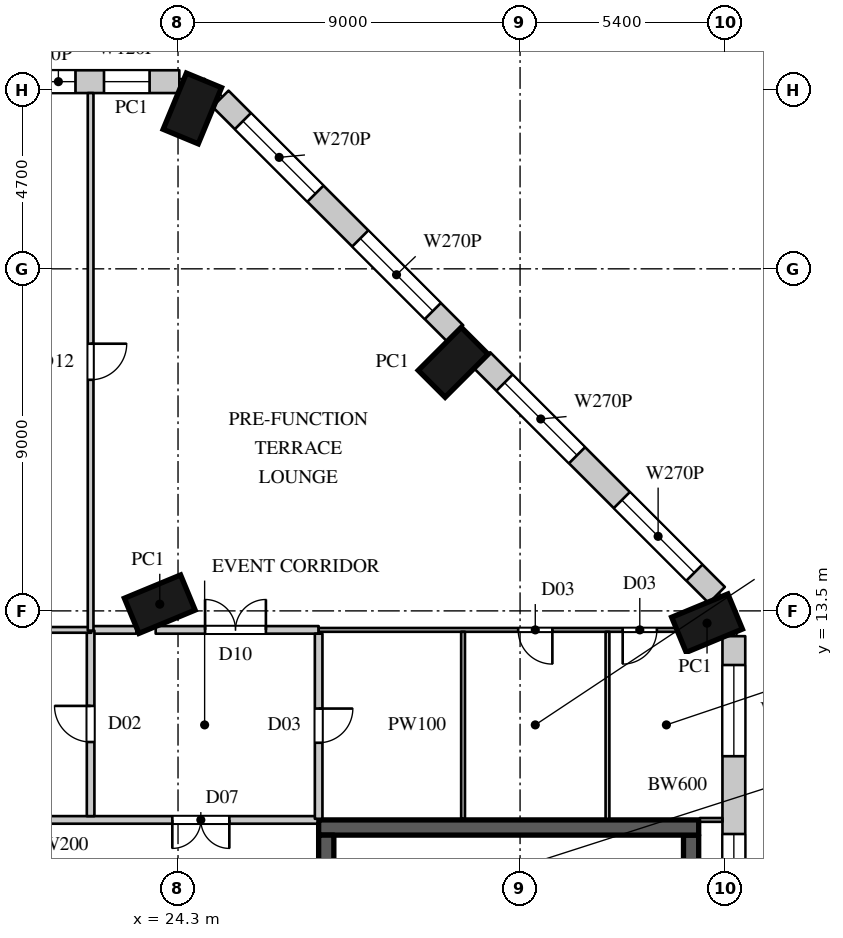
"""IFC4 building model, lengths in metres.
Left out: names, types, materials, properties, quantities, classifications, styles, units other than length and angle.
Written with IfcOpenShell. Run it as: python <this file> out.ifc"""

import sys

from ifc_helpers import new_model, si_unit, direction, frame, frame_2d, origin, origin_2d, place, context, subcontext, project, spatial, rectangle, extrude, element, fill, save


model = new_model("IFC4")
c1 = context("Model", 3, precision=1e-05, world=origin(), true_north=direction((0.0, 1.0)))
c2 = subcontext(c1, "Body", "Model", "MODEL_VIEW")
j1 = project(units=[si_unit("LENGTHUNIT", "METRE"), si_unit("PLANEANGLEUNIT", "RADIAN")], contexts=[c1])
p1 = place(None, origin())
s1 = spatial("IfcSite", under=j1, at=p1, CompositionType="ELEMENT")
p2 = place(p1, origin())
s2 = spatial("IfcBuilding", under=s1, at=p2, CompositionType="ELEMENT")
p3 = place(p2, frame((0.0, 0.0, 36.0)))
s3 = spatial("IfcBuildingStorey", under=s2, at=p3, CompositionType="ELEMENT", Elevation=36.0)
for number, where, z_axis, x_axis in (
    (1, (23.82, 13.677, 0.0), (0.0, 0.0, 1.0), (-0.383, 0.924, 0.0)),
    (2, (38.219, 13.177, 0.0), (0.0, 0.0, 1.0), (-0.383, 0.924, 0.0)),
    (3, (31.54, 20.04, 0.0), (0.0, 0.0, 1.0), (-0.707, 0.707, 0.0)),
    (4, (24.677, 26.719, 0.0), (0.0, 0.0, 1.0), (-0.924, 0.383, 0.0)),
):
    element("IfcColumn", number, at=place(p3, frame(where, z_axis=z_axis, x_axis=x_axis)), inside=s3, PredefinedType="COLUMN", context=c2, shape_type="SweptSolid", body=[
        extrude(rectangle(XDim=1.0, YDim=1.6, at=origin_2d()), origin(), (0.0, 0.0, 1.0), 8.0),
    ])
p4 = place(p3, frame((38.925, 5.0, 0.0), z_axis=(0.0, 0.0, 1.0), x_axis=(0.0, 1.0, 0.0)))
e5 = element("IfcWall", 5, at=p4, inside=s3, PredefinedType="ELEMENTEDWALL", context=c2, shape_type="SweptSolid", body=[
    extrude(rectangle(XDim=7.834, YDim=0.6, at=frame_2d((3.917, 0.0))), origin(), (0.0, 0.0, 1.0), 7.6),
])
p5 = place(p4, frame((4.676, 0.0, 1.5)))
e6 = element("IfcOpeningElement", 6, at=p5, cuts=e5, PredefinedType="OPENING", context=c2, shape_type="SweptSolid", body=[
    extrude(rectangle(XDim=2.4, YDim=2.4, at=frame_2d((1.2, 1.2))), frame((0.0, 0.31, 0.0), z_axis=(0.0, -1.0, 0.0), x_axis=(1.0, 0.0, 0.0)), (0.0, 0.0, 1.0), 0.62),
])
p6 = place(p4, frame((0.829, 0.0, 1.5)))
e7 = element("IfcOpeningElement", 7, at=p6, cuts=e5, PredefinedType="OPENING", context=c2, shape_type="SweptSolid", body=[
    extrude(rectangle(XDim=1.8, YDim=2.4, at=frame_2d((0.9, 1.2))), frame((0.0, 0.31, 0.0), z_axis=(0.0, -1.0, 0.0), x_axis=(1.0, 0.0, 0.0)), (0.0, 0.0, 1.0), 0.62),
])
p7 = place(p3, frame((38.476, 13.917, 0.0), z_axis=(0.0, 0.0, 1.0), x_axis=(-0.707092804673, 0.707120757424, 0.0)))
e8 = element("IfcWall", 8, at=p7, inside=s3, PredefinedType="ELEMENTEDWALL", context=c2, shape_type="SweptSolid", body=[
    extrude(rectangle(XDim=8.734, YDim=0.6, at=frame_2d((4.367, 0.0))), origin(), (0.0, 0.0, 1.0), 7.6),
])
p8 = place(p7, frame((0.833, 0.0, 1.5)))
e9 = element("IfcOpeningElement", 9, at=p8, cuts=e8, PredefinedType="OPENING", context=c2, shape_type="SweptSolid", body=[
    extrude(rectangle(XDim=2.7, YDim=2.4, at=frame_2d((1.35, 1.2))), frame((0.0, 0.31, 0.0), z_axis=(0.0, -1.0, 0.0), x_axis=(1.0, 0.0, 0.0)), (0.0, 0.0, 1.0), 0.62),
])
p9 = place(p7, frame((5.2, 0.0, 1.5)))
e10 = element("IfcOpeningElement", 10, at=p9, cuts=e8, PredefinedType="OPENING", context=c2, shape_type="SweptSolid", body=[
    extrude(rectangle(XDim=2.7, YDim=2.4, at=frame_2d((1.35, 1.2))), frame((0.0, 0.31, 0.0), z_axis=(0.0, -1.0, 0.0), x_axis=(1.0, 0.0, 0.0)), (0.0, 0.0, 1.0), 0.62),
])
p10 = place(p3, frame((31.594, 20.801, 0.0), z_axis=(0.0, 0.0, 1.0), x_axis=(-0.707120757424, 0.707092804673, 0.0)))
e11 = element("IfcWall", 11, at=p10, inside=s3, PredefinedType="ELEMENTEDWALL", context=c2, shape_type="SweptSolid", body=[
    extrude(rectangle(XDim=8.734, YDim=0.6, at=frame_2d((4.367, 0.0))), origin(), (0.0, 0.0, 1.0), 7.6),
])
p11 = place(p10, frame((0.833, 0.0, 1.5)))
e12 = element("IfcOpeningElement", 12, at=p11, cuts=e11, PredefinedType="OPENING", context=c2, shape_type="SweptSolid", body=[
    extrude(rectangle(XDim=2.7, YDim=2.4, at=frame_2d((1.35, 1.2))), frame((0.0, 0.31, 0.0), z_axis=(0.0, -1.0, 0.0), x_axis=(1.0, 0.0, 0.0)), (0.0, 0.0, 1.0), 0.62),
])
p12 = place(p10, frame((5.2, 0.0, 1.5)))
e13 = element("IfcOpeningElement", 13, at=p12, cuts=e11, PredefinedType="OPENING", context=c2, shape_type="SweptSolid", body=[
    extrude(rectangle(XDim=2.7, YDim=2.4, at=frame_2d((1.35, 1.2))), frame((0.0, 0.31, 0.0), z_axis=(0.0, -1.0, 0.0), x_axis=(1.0, 0.0, 0.0)), (0.0, 0.0, 1.0), 0.62),
])
p13 = place(p3, frame((24.334, 27.425, 0.0), z_axis=(0.0, 0.0, 1.0), x_axis=(-1.0, 0.0, 0.0)))
e14 = element("IfcWall", 14, at=p13, inside=s3, PredefinedType="ELEMENTEDWALL", context=c2, shape_type="SweptSolid", body=[
    extrude(rectangle(XDim=53.534, YDim=0.6, at=frame_2d((26.767, 0.0))), origin(), (0.0, 0.0, 1.0), 7.6),
])
p14 = place(p13, frame((5.192, 0.0, 1.5)))
e15 = element("IfcOpeningElement", 15, at=p14, cuts=e14, PredefinedType="OPENING", context=c2, shape_type="SweptSolid", body=[
    extrude(rectangle(XDim=3.0, YDim=2.4, at=frame_2d((1.5, 1.2))), frame((0.0, 0.31, 0.0), z_axis=(0.0, -1.0, 0.0), x_axis=(1.0, 0.0, 0.0)), (0.0, 0.0, 1.0), 0.62),
])
p15 = place(p13, frame((14.114, 0.0, 1.5)))
e16 = element("IfcOpeningElement", 16, at=p15, cuts=e14, PredefinedType="OPENING", context=c2, shape_type="SweptSolid", body=[
    extrude(rectangle(XDim=3.0, YDim=2.4, at=frame_2d((1.5, 1.2))), frame((0.0, 0.31, 0.0), z_axis=(0.0, -1.0, 0.0), x_axis=(1.0, 0.0, 0.0)), (0.0, 0.0, 1.0), 0.62),
])
p16 = place(p13, frame((18.575, 0.0, 1.5)))
e17 = element("IfcOpeningElement", 17, at=p16, cuts=e14, PredefinedType="OPENING", context=c2, shape_type="SweptSolid", body=[
    extrude(rectangle(XDim=3.0, YDim=2.4, at=frame_2d((1.5, 1.2))), frame((0.0, 0.31, 0.0), z_axis=(0.0, -1.0, 0.0), x_axis=(1.0, 0.0, 0.0)), (0.0, 0.0, 1.0), 0.62),
])
p17 = place(p13, frame((23.037, 0.0, 1.5)))
e18 = element("IfcOpeningElement", 18, at=p17, cuts=e14, PredefinedType="OPENING", context=c2, shape_type="SweptSolid", body=[
    extrude(rectangle(XDim=3.0, YDim=2.4, at=frame_2d((1.5, 1.2))), frame((0.0, 0.31, 0.0), z_axis=(0.0, -1.0, 0.0), x_axis=(1.0, 0.0, 0.0)), (0.0, 0.0, 1.0), 0.62),
])
p18 = place(p13, frame((27.498, 0.0, 1.5)))
e19 = element("IfcOpeningElement", 19, at=p18, cuts=e14, PredefinedType="OPENING", context=c2, shape_type="SweptSolid", body=[
    extrude(rectangle(XDim=3.0, YDim=2.4, at=frame_2d((1.5, 1.2))), frame((0.0, 0.31, 0.0), z_axis=(0.0, -1.0, 0.0), x_axis=(1.0, 0.0, 0.0)), (0.0, 0.0, 1.0), 0.62),
])
p19 = place(p13, frame((36.42, 0.0, 1.5)))
e20 = element("IfcOpeningElement", 20, at=p19, cuts=e14, PredefinedType="OPENING", context=c2, shape_type="SweptSolid", body=[
    extrude(rectangle(XDim=3.0, YDim=2.4, at=frame_2d((1.5, 1.2))), frame((0.0, 0.31, 0.0), z_axis=(0.0, -1.0, 0.0), x_axis=(1.0, 0.0, 0.0)), (0.0, 0.0, 1.0), 0.62),
])
p20 = place(p13, frame((40.882, 0.0, 1.5)))
e21 = element("IfcOpeningElement", 21, at=p20, cuts=e14, PredefinedType="OPENING", context=c2, shape_type="SweptSolid", body=[
    extrude(rectangle(XDim=3.0, YDim=2.4, at=frame_2d((1.5, 1.2))), frame((0.0, 0.31, 0.0), z_axis=(0.0, -1.0, 0.0), x_axis=(1.0, 0.0, 0.0)), (0.0, 0.0, 1.0), 0.62),
])
p21 = place(p13, frame((45.343, 0.0, 1.5)))
e22 = element("IfcOpeningElement", 22, at=p21, cuts=e14, PredefinedType="OPENING", context=c2, shape_type="SweptSolid", body=[
    extrude(rectangle(XDim=3.0, YDim=2.4, at=frame_2d((1.5, 1.2))), frame((0.0, 0.31, 0.0), z_axis=(0.0, -1.0, 0.0), x_axis=(1.0, 0.0, 0.0)), (0.0, 0.0, 1.0), 0.62),
])
p22 = place(p13, frame((49.804, 0.0, 1.5)))
e23 = element("IfcOpeningElement", 23, at=p22, cuts=e14, PredefinedType="OPENING", context=c2, shape_type="SweptSolid", body=[
    extrude(rectangle(XDim=3.0, YDim=2.4, at=frame_2d((1.5, 1.2))), frame((0.0, 0.31, 0.0), z_axis=(0.0, -1.0, 0.0), x_axis=(1.0, 0.0, 0.0)), (0.0, 0.0, 1.0), 0.62),
])
p23 = place(p13, frame((0.782, 0.0, 1.5)))
e24 = element("IfcOpeningElement", 24, at=p23, cuts=e14, PredefinedType="OPENING", context=c2, shape_type="SweptSolid", body=[
    extrude(rectangle(XDim=1.2, YDim=2.4, at=frame_2d((0.6, 1.2))), frame((0.0, 0.31, 0.0), z_axis=(0.0, -1.0, 0.0), x_axis=(1.0, 0.0, 0.0)), (0.0, 0.0, 1.0), 0.62),
])
p24 = place(p13, frame((2.733, 0.0, 1.5)))
e25 = element("IfcOpeningElement", 25, at=p24, cuts=e14, PredefinedType="OPENING", context=c2, shape_type="SweptSolid", body=[
    extrude(rectangle(XDim=0.9, YDim=2.4, at=frame_2d((0.45, 1.2))), frame((0.0, 0.31, 0.0), z_axis=(0.0, -1.0, 0.0), x_axis=(1.0, 0.0, 0.0)), (0.0, 0.0, 1.0), 0.62),
])
p25 = place(p13, frame((10.194, 0.0, 1.5)))
e26 = element("IfcOpeningElement", 26, at=p25, cuts=e14, PredefinedType="OPENING", context=c2, shape_type="SweptSolid", body=[
    extrude(rectangle(XDim=2.4, YDim=2.4, at=frame_2d((1.2, 1.2))), frame((0.0, 0.31, 0.0), z_axis=(0.0, -1.0, 0.0), x_axis=(1.0, 0.0, 0.0)), (0.0, 0.0, 1.0), 0.62),
])
p26 = place(p13, frame((32.047, 0.0, 1.5)))
e27 = element("IfcOpeningElement", 27, at=p26, cuts=e14, PredefinedType="OPENING", context=c2, shape_type="SweptSolid", body=[
    extrude(rectangle(XDim=2.4, YDim=2.4, at=frame_2d((1.2, 1.2))), frame((0.0, 0.31, 0.0), z_axis=(0.0, -1.0, 0.0), x_axis=(1.0, 0.0, 0.0)), (0.0, 0.0, 1.0), 0.62),
])
p27 = place(p3, frame((28.0, 7.8, 0.0), z_axis=(0.0, 0.0, 1.0), x_axis=(1.0, 0.0, 0.0)))
e28 = element("IfcWall", 28, at=p27, inside=s3, PredefinedType="SHEAR", context=c2, shape_type="SweptSolid", body=[
    extrude(rectangle(XDim=10.0, YDim=0.4, at=frame_2d((5.0, 0.0))), origin(), (0.0, 0.0, 1.0), 8.0),
])
p28 = place(p3, frame((37.8, -7.6, 0.0), z_axis=(0.0, 0.0, 1.0), x_axis=(0.0, 1.0, 0.0)))
e29 = element("IfcWall", 29, at=p28, inside=s3, PredefinedType="SHEAR", context=c2, shape_type="SweptSolid", body=[
    extrude(rectangle(XDim=15.2, YDim=0.4, at=frame_2d((7.6, 0.0))), origin(), (0.0, 0.0, 1.0), 8.0),
])
p29 = place(p3, frame((28.2, -7.6, 0.0), z_axis=(0.0, 0.0, 1.0), x_axis=(0.0, 1.0, 0.0)))
e30 = element("IfcWall", 30, at=p29, inside=s3, PredefinedType="SHEAR", context=c2, shape_type="SweptSolid", body=[
    extrude(rectangle(XDim=15.2, YDim=0.4, at=frame_2d((7.6, 0.0))), origin(), (0.0, 0.0, 1.0), 8.0),
])
p30 = place(p29, frame((4.05, 0.0, 0.0)))
e31 = element("IfcOpeningElement", 31, at=p30, cuts=e30, PredefinedType="OPENING", context=c2, shape_type="SweptSolid", body=[
    extrude(rectangle(XDim=1.5, YDim=2.4, at=frame_2d((0.75, 1.2))), frame((0.0, 0.21, 0.0), z_axis=(0.0, -1.0, 0.0), x_axis=(1.0, 0.0, 0.0)), (0.0, 0.0, 1.0), 0.42),
])
p31 = place(p29, frame((6.95, 0.0, 0.0)))
e32 = element("IfcOpeningElement", 32, at=p31, cuts=e30, PredefinedType="OPENING", context=c2, shape_type="SweptSolid", body=[
    extrude(rectangle(XDim=1.5, YDim=2.4, at=frame_2d((0.75, 1.2))), frame((0.0, 0.21, 0.0), z_axis=(0.0, -1.0, 0.0), x_axis=(1.0, 0.0, 0.0)), (0.0, 0.0, 1.0), 0.42),
])
p32 = place(p3, frame((14.4, 8.0, 0.0), z_axis=(0.0, 0.0, 1.0), x_axis=(1.0, 0.0, 0.0)))
e33 = element("IfcWall", 33, at=p32, inside=s3, PredefinedType="PARTITIONING", context=c2, shape_type="SweptSolid", body=[
    extrude(rectangle(XDim=13.57, YDim=0.2, at=frame_2d((6.785, 0.0))), origin(), (0.0, 0.0, 1.0), 7.598),
])
p33 = place(p32, frame((9.75, 0.0, 0.0)))
e34 = element("IfcOpeningElement", 34, at=p33, cuts=e33, PredefinedType="OPENING", context=c2, shape_type="SweptSolid", body=[
    extrude(rectangle(XDim=1.5, YDim=2.4, at=frame_2d((0.75, 1.2))), frame((0.0, 0.11, 0.0), z_axis=(0.0, -1.0, 0.0), x_axis=(1.0, 0.0, 0.0)), (0.0, 0.0, 1.0), 0.22),
])
p34 = place(p3, frame((22.02, 13.0, 0.0), z_axis=(0.0, 0.0, 1.0), x_axis=(1.0, 0.0, 0.0)))
e35 = element("IfcWall", 35, at=p34, inside=s3, PredefinedType="PARTITIONING", context=c2, shape_type="SweptSolid", body=[
    extrude(rectangle(XDim=1.184, YDim=0.2, at=frame_2d((0.592, 0.0))), origin(), (0.0, 0.0, 1.0), 7.598),
])
p35 = place(p3, frame((23.712, 13.0, 0.0), z_axis=(0.0, 0.0, 1.0), x_axis=(1.0, 0.0, 0.0)))
e36 = element("IfcWall", 36, at=p35, inside=s3, PredefinedType="PARTITIONING", context=c2, shape_type="SweptSolid", body=[
    extrude(rectangle(XDim=4.288, YDim=0.2, at=frame_2d((2.144, 0.0))), origin(), (0.0, 0.0, 1.0), 7.598),
])
p36 = place(p35, frame((1.3, 0.0, 0.0)))
e37 = element("IfcOpeningElement", 37, at=p36, cuts=e36, PredefinedType="OPENING", context=c2, shape_type="SweptSolid", body=[
    extrude(rectangle(XDim=1.6, YDim=2.4, at=frame_2d((0.8, 1.2))), frame((0.0, 0.11, 0.0), z_axis=(0.0, -1.0, 0.0), x_axis=(1.0, 0.0, 0.0)), (0.0, 0.0, 1.0), 0.22),
])
p37 = place(p3, frame((22.0, 8.1, 0.0), z_axis=(0.0, 0.0, 1.0), x_axis=(0.0, 1.0, 0.0)))
e38 = element("IfcWall", 38, at=p37, inside=s3, PredefinedType="PARTITIONING", context=c2, shape_type="SweptSolid", body=[
    extrude(rectangle(XDim=4.88, YDim=0.2, at=frame_2d((2.44, 0.0))), origin(), (0.0, 0.0, 1.0), 7.598),
])
p38 = place(p37, frame((1.95, 0.0, 0.0)))
e39 = element("IfcOpeningElement", 39, at=p38, cuts=e38, PredefinedType="OPENING", context=c2, shape_type="SweptSolid", body=[
    extrude(rectangle(XDim=0.95, YDim=2.2, at=frame_2d((0.475, 1.1))), frame((0.0, 0.11, 0.0), z_axis=(0.0, -1.0, 0.0), x_axis=(1.0, 0.0, 0.0)), (0.0, 0.0, 1.0), 0.22),
])
p39 = place(p3, frame((28.0, 8.03, 0.0), z_axis=(0.0, 0.0, 1.0), x_axis=(0.0, 1.0, 0.0)))
e40 = element("IfcWall", 40, at=p39, inside=s3, PredefinedType="PARTITIONING", context=c2, shape_type="SweptSolid", body=[
    extrude(rectangle(XDim=4.87, YDim=0.2, at=frame_2d((2.435, 0.0))), origin(), (0.0, 0.0, 1.0), 7.598),
])
p40 = place(p39, frame((2.0, 0.0, 0.0)))
e41 = element("IfcOpeningElement", 41, at=p40, cuts=e40, PredefinedType="OPENING", context=c2, shape_type="SweptSolid", body=[
    extrude(rectangle(XDim=0.9, YDim=2.2, at=frame_2d((0.45, 1.1))), frame((0.0, 0.11, 0.0), z_axis=(0.0, -1.0, 0.0), x_axis=(1.0, 0.0, 0.0)), (0.0, 0.0, 1.0), 0.22),
])
p41 = place(p3, frame((14.575, 13.0, 0.0), z_axis=(0.0, 0.0, 1.0), x_axis=(1.0, 0.0, 0.0)))
e42 = element("IfcWall", 42, at=p41, inside=s3, PredefinedType="PARTITIONING", context=c2, shape_type="SweptSolid", body=[
    extrude(rectangle(XDim=7.445, YDim=0.15, at=frame_2d((3.723, 0.0))), origin(), (0.0, 0.0, 1.0), 7.598),
])
p42 = place(p3, frame((22.0, 12.98, 0.0), z_axis=(0.0, 0.0, 1.0), x_axis=(0.0, 1.0, 0.0)))
e43 = element("IfcWall", 43, at=p42, inside=s3, PredefinedType="PARTITIONING", context=c2, shape_type="SweptSolid", body=[
    extrude(rectangle(XDim=14.145, YDim=0.15, at=frame_2d((7.073, 0.0))), origin(), (0.0, 0.0, 1.0), 7.598),
])
p43 = place(p42, frame((6.6, 0.0, 0.0)))
e44 = element("IfcOpeningElement", 44, at=p43, cuts=e43, PredefinedType="OPENING", context=c2, shape_type="SweptSolid", body=[
    extrude(rectangle(XDim=0.95, YDim=2.2, at=frame_2d((0.475, 1.1))), frame((0.0, 0.085, 0.0), z_axis=(0.0, -1.0, 0.0), x_axis=(1.0, 0.0, 0.0)), (0.0, 0.0, 1.0), 0.17),
])
p44 = place(p3, frame((28.0, 13.0, 0.0), z_axis=(0.0, 0.0, 1.0), x_axis=(1.0, 0.0, 0.0)))
e45 = element("IfcWall", 45, at=p44, inside=s3, PredefinedType="PARTITIONING", context=c2, shape_type="SweptSolid", body=[
    extrude(rectangle(XDim=9.417, YDim=0.1, at=frame_2d((4.708, 0.0))), origin(), (0.0, 0.0, 1.0), 7.598),
])
p45 = place(p44, frame((5.25, 0.0, 0.0)))
e46 = element("IfcOpeningElement", 46, at=p45, cuts=e45, PredefinedType="OPENING", context=c2, shape_type="SweptSolid", body=[
    extrude(rectangle(XDim=0.9, YDim=2.2, at=frame_2d((0.45, 1.1))), frame((0.0, 0.06, 0.0), z_axis=(0.0, -1.0, 0.0), x_axis=(1.0, 0.0, 0.0)), (0.0, 0.0, 1.0), 0.12),
])
p46 = place(p44, frame((8.0, 0.0, 0.0)))
e47 = element("IfcOpeningElement", 47, at=p46, cuts=e45, PredefinedType="OPENING", context=c2, shape_type="SweptSolid", body=[
    extrude(rectangle(XDim=0.9, YDim=2.2, at=frame_2d((0.45, 1.1))), frame((0.0, 0.06, 0.0), z_axis=(0.0, -1.0, 0.0), x_axis=(1.0, 0.0, 0.0)), (0.0, 0.0, 1.0), 0.12),
])
for number, where, z_axis, x_axis in (
    (48, (31.8, 8.03, 0.0), (0.0, 0.0, 1.0), (0.0, 1.0, 0.0)),
    (49, (35.6, 8.03, 0.0), (0.0, 0.0, 1.0), (0.0, 1.0, 0.0)),
):
    element("IfcWall", number, at=place(p3, frame(where, z_axis=z_axis, x_axis=x_axis)), inside=s3, PredefinedType="PARTITIONING", context=c2, shape_type="SweptSolid", body=[
        extrude(rectangle(XDim=4.92, YDim=0.1, at=frame_2d((2.46, 0.0))), origin(), (0.0, 0.0, 1.0), 7.598),
    ])
p47 = place(p3, frame((38.03, 8.0, 0.0), z_axis=(0.0, 0.0, 1.0), x_axis=(1.0, 0.0, 0.0)))
e50 = element("IfcWall", 50, at=p47, inside=s3, PredefinedType="PARTITIONING", context=c2, shape_type="SweptSolid", body=[
    extrude(rectangle(XDim=0.595, YDim=0.1, at=frame_2d((0.297, 0.0))), origin(), (0.0, 0.0, 1.0), 7.598),
])
p48 = place(p5, origin())
e51 = element("IfcWindow", 51, at=p48, inside=s3, PartitioningType="SINGLE_PANEL", PredefinedType="WINDOW", context=c2, shape_type="SweptSolid", body=[
    extrude(rectangle(XDim=2.4, YDim=2.4, at=frame_2d((1.2, 1.2))), frame((0.0, 0.06, 0.0), z_axis=(0.0, -1.0, 0.0), x_axis=(1.0, 0.0, 0.0)), (0.0, 0.0, 1.0), 0.06),
])
fill(e6, e51)
p49 = place(p8, origin())
e52 = element("IfcWindow", 52, at=p49, inside=s3, PartitioningType="SINGLE_PANEL", PredefinedType="WINDOW", context=c2, shape_type="SweptSolid", body=[
    extrude(rectangle(XDim=2.7, YDim=2.4, at=frame_2d((1.35, 1.2))), frame((0.0, 0.06, 0.0), z_axis=(0.0, -1.0, 0.0), x_axis=(1.0, 0.0, 0.0)), (0.0, 0.0, 1.0), 0.06),
])
fill(e9, e52)
p50 = place(p9, origin())
e53 = element("IfcWindow", 53, at=p50, inside=s3, PartitioningType="SINGLE_PANEL", PredefinedType="WINDOW", context=c2, shape_type="SweptSolid", body=[
    extrude(rectangle(XDim=2.7, YDim=2.4, at=frame_2d((1.35, 1.2))), frame((0.0, 0.06, 0.0), z_axis=(0.0, -1.0, 0.0), x_axis=(1.0, 0.0, 0.0)), (0.0, 0.0, 1.0), 0.06),
])
fill(e10, e53)
p51 = place(p11, origin())
e54 = element("IfcWindow", 54, at=p51, inside=s3, PartitioningType="SINGLE_PANEL", PredefinedType="WINDOW", context=c2, shape_type="SweptSolid", body=[
    extrude(rectangle(XDim=2.7, YDim=2.4, at=frame_2d((1.35, 1.2))), frame((0.0, 0.06, 0.0), z_axis=(0.0, -1.0, 0.0), x_axis=(1.0, 0.0, 0.0)), (0.0, 0.0, 1.0), 0.06),
])
fill(e12, e54)
p52 = place(p12, origin())
e55 = element("IfcWindow", 55, at=p52, inside=s3, PartitioningType="SINGLE_PANEL", PredefinedType="WINDOW", context=c2, shape_type="SweptSolid", body=[
    extrude(rectangle(XDim=2.7, YDim=2.4, at=frame_2d((1.35, 1.2))), frame((0.0, 0.06, 0.0), z_axis=(0.0, -1.0, 0.0), x_axis=(1.0, 0.0, 0.0)), (0.0, 0.0, 1.0), 0.06),
])
fill(e13, e55)
p53 = place(p40, origin())
e56 = element("IfcDoor", 56, at=p53, inside=s3, OperationType="SINGLE_SWING_LEFT", PredefinedType="DOOR", context=c2, shape_type="SweptSolid", body=[
    extrude(rectangle(XDim=0.9, YDim=2.2, at=frame_2d((0.45, 1.1))), frame((0.0, 0.025, 0.0), z_axis=(0.0, -1.0, 0.0), x_axis=(1.0, 0.0, 0.0)), (0.0, 0.0, 1.0), 0.05),
])
fill(e41, e56)
p54 = place(p45, origin())
e57 = element("IfcDoor", 57, at=p54, inside=s3, OperationType="SINGLE_SWING_LEFT", PredefinedType="DOOR", context=c2, shape_type="SweptSolid", body=[
    extrude(rectangle(XDim=0.9, YDim=2.2, at=frame_2d((0.45, 1.1))), frame((0.0, 0.025, 0.0), z_axis=(0.0, -1.0, 0.0), x_axis=(1.0, 0.0, 0.0)), (0.0, 0.0, 1.0), 0.05),
])
fill(e46, e57)
p55 = place(p46, origin())
e58 = element("IfcDoor", 58, at=p55, inside=s3, OperationType="SINGLE_SWING_RIGHT", PredefinedType="DOOR", context=c2, shape_type="SweptSolid", body=[
    extrude(rectangle(XDim=0.9, YDim=2.2, at=frame_2d((0.45, 1.1))), frame((0.0, 0.025, 0.0), z_axis=(0.0, -1.0, 0.0), x_axis=(1.0, 0.0, 0.0)), (0.0, 0.0, 1.0), 0.05),
])
fill(e47, e58)
p56 = place(p38, origin())
e59 = element("IfcDoor", 59, at=p56, inside=s3, OperationType="SINGLE_SWING_RIGHT", PredefinedType="DOOR", context=c2, shape_type="SweptSolid", body=[
    extrude(rectangle(XDim=0.95, YDim=2.2, at=frame_2d((0.475, 1.1))), frame((0.0, 0.025, 0.0), z_axis=(0.0, -1.0, 0.0), x_axis=(1.0, 0.0, 0.0)), (0.0, 0.0, 1.0), 0.05),
])
fill(e39, e59)
p57 = place(p43, origin())
e60 = element("IfcDoor", 60, at=p57, inside=s3, OperationType="SINGLE_SWING_LEFT", PredefinedType="DOOR", context=c2, shape_type="SweptSolid", body=[
    extrude(rectangle(XDim=0.95, YDim=2.2, at=frame_2d((0.475, 1.1))), frame((0.0, 0.025, 0.0), z_axis=(0.0, -1.0, 0.0), x_axis=(1.0, 0.0, 0.0)), (0.0, 0.0, 1.0), 0.05),
])
fill(e44, e60)
p58 = place(p36, origin())
e61 = element("IfcDoor", 61, at=p58, inside=s3, OperationType="DOUBLE_DOOR_SINGLE_SWING", PredefinedType="DOOR", context=c2, shape_type="SweptSolid", body=[
    extrude(rectangle(XDim=1.6, YDim=2.4, at=frame_2d((0.8, 1.2))), frame((0.0, 0.025, 0.0), z_axis=(0.0, -1.0, 0.0), x_axis=(1.0, 0.0, 0.0)), (0.0, 0.0, 1.0), 0.05),
])
fill(e37, e61)
p59 = place(p33, origin())
e62 = element("IfcDoor", 62, at=p59, inside=s3, OperationType="DOUBLE_DOOR_SINGLE_SWING", PredefinedType="DOOR", context=c2, shape_type="SweptSolid", body=[
    extrude(rectangle(XDim=1.5, YDim=2.4, at=frame_2d((0.75, 1.2))), frame((0.0, 0.025, 0.0), z_axis=(0.0, -1.0, 0.0), x_axis=(1.0, 0.0, 0.0)), (0.0, 0.0, 1.0), 0.05),
])
fill(e34, e62)
p60 = place(p6, origin())
e63 = element("IfcWindow", 63, at=p60, inside=s3, PartitioningType="SINGLE_PANEL", PredefinedType="WINDOW", context=c2, shape_type="SweptSolid", body=[
    extrude(rectangle(XDim=1.8, YDim=2.4, at=frame_2d((0.9, 1.2))), frame((0.0, 0.06, 0.0), z_axis=(0.0, -1.0, 0.0), x_axis=(1.0, 0.0, 0.0)), (0.0, 0.0, 1.0), 0.06),
])
fill(e7, e63)
p61 = place(p23, origin())
e64 = element("IfcWindow", 64, at=p61, inside=s3, PartitioningType="SINGLE_PANEL", PredefinedType="WINDOW", context=c2, shape_type="SweptSolid", body=[
    extrude(rectangle(XDim=1.2, YDim=2.4, at=frame_2d((0.6, 1.2))), frame((0.0, 0.06, 0.0), z_axis=(0.0, -1.0, 0.0), x_axis=(1.0, 0.0, 0.0)), (0.0, 0.0, 1.0), 0.06),
])
fill(e24, e64)
p62 = place(p24, origin())
e65 = element("IfcWindow", 65, at=p62, inside=s3, PartitioningType="SINGLE_PANEL", PredefinedType="WINDOW", context=c2, shape_type="SweptSolid", body=[
    extrude(rectangle(XDim=0.9, YDim=2.4, at=frame_2d((0.45, 1.2))), frame((0.0, 0.06, 0.0), z_axis=(0.0, -1.0, 0.0), x_axis=(1.0, 0.0, 0.0)), (0.0, 0.0, 1.0), 0.06),
])
fill(e25, e65)
save(model, sys.argv[1])
